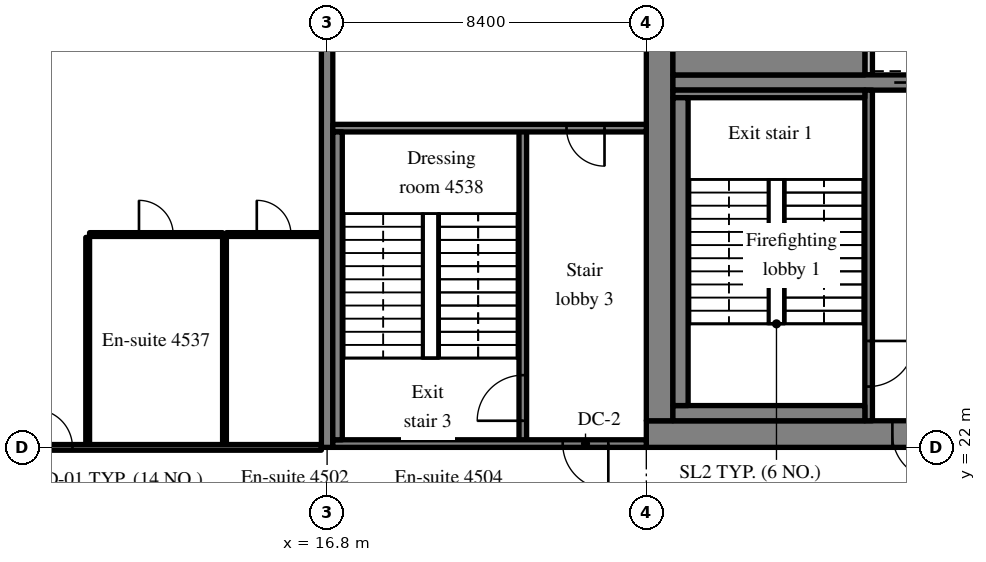
"""IFC4 building model, lengths in metres.
Left out: names, types, materials, properties, quantities, classifications, styles, units other than length and angle.
Written with IfcOpenShell. Run it as: python <this file> out.ifc"""

import sys

from ifc_helpers import new_model, si_unit, direction, frame, frame_2d, origin, place, context, subcontext, project, spatial, rectangle, extrude, source, transform, mapped, element, fill, save


model = new_model("IFC4")
c1 = context("Model", 3, precision=1e-05, world=origin(), true_north=direction((0.0, 1.0)))
c2 = subcontext(c1, "Body", "Model", "MODEL_VIEW")
j1 = project(units=[si_unit("LENGTHUNIT", "METRE"), si_unit("PLANEANGLEUNIT", "RADIAN")], contexts=[c1])
p1 = place(None, origin())
s1 = spatial("IfcSite", under=j1, at=p1, CompositionType="ELEMENT")
p2 = place(p1, origin())
s2 = spatial("IfcBuilding", under=s1, at=p2, CompositionType="ELEMENT")
p3 = place(p2, frame((0.0, 0.0, 185.8)))
s3 = spatial("IfcBuildingStorey", under=s2, at=p3, CompositionType="ELEMENT", Elevation=185.8)
m1 = source(origin(), c2, "Body", "SweptSolid", [
    extrude(rectangle(XDim=50.4, YDim=0.7, at=frame_2d((25.2, 0.0))), origin(), (0.0, 0.0, 1.0), 3.52),
])
p4 = place(p3, frame((25.2, 22.35, 0.0), z_axis=(0.0, 0.0, 1.0), x_axis=(1.0, 0.0, 0.0)))
e1 = element("IfcWall", 1, at=p4, inside=s3, PredefinedType="SHEAR", context=c2, shape_type="MappedRepresentation", body=[
    mapped(m1, transform((0.0, 0.0, 0.0), scale=1.0)),
])
m2 = source(origin(), c2, "Body", "SweptSolid", [
    extrude(rectangle(XDim=1.8, YDim=2.1, at=frame_2d((0.9, 1.05))), frame((0.0, 0.36, 0.0), z_axis=(0.0, -1.0, 0.0), x_axis=(1.0, 0.0, 0.0)), (0.0, 0.0, 1.0), 0.72),
])
p5 = place(p4, frame((15.9, 0.0, 0.0)))
e2 = element("IfcOpeningElement", 2, at=p5, cuts=e1, PredefinedType="OPENING", context=c2, shape_type="MappedRepresentation", body=[
    mapped(m2, transform((0.0, 0.0, 0.0), scale=1.0)),
])
m3 = source(origin(), c2, "Body", "SweptSolid", [
    extrude(rectangle(XDim=0.9, YDim=2.1, at=frame_2d((0.45, 1.05))), frame((0.0, 0.36, 0.0), z_axis=(0.0, -1.0, 0.0), x_axis=(1.0, 0.0, 0.0)), (0.0, 0.0, 1.0), 0.72),
])
p6 = place(p4, frame((9.7, 0.0, 0.0)))
e3 = element("IfcOpeningElement", 3, at=p6, cuts=e1, PredefinedType="OPENING", context=c2, shape_type="MappedRepresentation", body=[
    mapped(m3, transform((0.0, 0.0, 0.0), scale=1.0)),
])
p7 = place(p4, frame((21.5, 0.0, 0.0)))
e4 = element("IfcOpeningElement", 4, at=p7, cuts=e1, PredefinedType="OPENING", context=c2, shape_type="MappedRepresentation", body=[
    mapped(m3, transform((0.0, 0.0, 0.0), scale=1.0)),
])
p8 = place(p4, frame((32.7, 0.0, 0.0)))
e5 = element("IfcOpeningElement", 5, at=p8, cuts=e1, PredefinedType="OPENING", context=c2, shape_type="MappedRepresentation", body=[
    mapped(m2, transform((0.0, 0.0, 0.0), scale=1.0)),
])
m4 = source(origin(), c2, "Body", "SweptSolid", [
    extrude(rectangle(XDim=1.2, YDim=2.1, at=frame_2d((0.6, 1.05))), frame((0.0, 0.36, 0.0), z_axis=(0.0, -1.0, 0.0), x_axis=(1.0, 0.0, 0.0)), (0.0, 0.0, 1.0), 0.72),
])
p9 = place(p4, frame((6.475, 0.0, 0.0)))
e6 = element("IfcOpeningElement", 6, at=p9, cuts=e1, PredefinedType="OPENING", context=c2, shape_type="MappedRepresentation", body=[
    mapped(m4, transform((0.0, 0.0, 0.0), scale=1.0)),
])
p10 = place(p4, frame((47.875, 0.0, 0.0)))
e7 = element("IfcOpeningElement", 7, at=p10, cuts=e1, PredefinedType="OPENING", context=c2, shape_type="MappedRepresentation", body=[
    mapped(m4, transform((0.0, 0.0, 0.0), scale=1.0)),
])
m5 = source(origin(), c2, "Body", "SweptSolid", [
    extrude(rectangle(XDim=18.6, YDim=0.7, at=frame_2d((9.3, 0.0))), origin(), (0.0, 0.0, 1.0), 3.52),
])
p11 = place(p3, frame((25.55, 22.7, 0.0), z_axis=(0.0, 0.0, 1.0), x_axis=(0.0, 1.0, 0.0)))
e8 = element("IfcWall", 8, at=p11, inside=s3, PredefinedType="SHEAR", context=c2, shape_type="MappedRepresentation", body=[
    mapped(m5, transform((0.0, 0.0, 0.0), scale=1.0)),
])
m6 = source(origin(), c2, "Body", "SweptSolid", [
    extrude(rectangle(XDim=7.5, YDim=0.4, at=frame_2d((3.75, 0.0))), origin(), (0.0, 0.0, 1.0), 3.52),
])
p12 = place(p3, frame((25.9, 31.6, 0.0), z_axis=(0.0, 0.0, 1.0), x_axis=(1.0, 0.0, 0.0)))
e9 = element("IfcWall", 9, at=p12, inside=s3, PredefinedType="SHEAR", context=c2, shape_type="MappedRepresentation", body=[
    mapped(m6, transform((0.0, 0.0, 0.0), scale=1.0)),
])
m7 = source(origin(), c2, "Body", "SweptSolid", [
    extrude(rectangle(XDim=1.1, YDim=2.1, at=frame_2d((0.55, 1.05))), frame((0.0, 0.21, 0.0), z_axis=(0.0, -1.0, 0.0), x_axis=(1.0, 0.0, 0.0)), (0.0, 0.0, 1.0), 0.42),
])
p13 = place(p12, frame((5.825, 0.0, 0.0)))
e10 = element("IfcOpeningElement", 10, at=p13, cuts=e9, PredefinedType="OPENING", context=c2, shape_type="MappedRepresentation", body=[
    mapped(m7, transform((0.0, 0.0, 0.0), scale=1.0)),
])
m8 = source(origin(), c2, "Body", "SweptSolid", [
    extrude(rectangle(XDim=20.0, YDim=0.3, at=frame_2d((10.0, 0.0))), origin(), (0.0, 0.0, 1.0), 3.52),
])
p14 = place(p3, frame((16.8, 22.0, 0.0), z_axis=(0.0, 0.0, 1.0), x_axis=(0.0, 1.0, 0.0)))
e11 = element("IfcWall", 11, at=p14, inside=s3, PredefinedType="SHEAR", context=c2, shape_type="MappedRepresentation", body=[
    mapped(m8, transform((0.0, 0.0, 0.0), scale=1.0)),
])
m9 = source(origin(), c2, "Body", "SweptSolid", [
    extrude(rectangle(XDim=8.7, YDim=0.2, at=frame_2d((4.35, 0.0))), origin(), (0.0, 0.0, 1.0), 3.52),
])
p15 = place(p3, frame((31.05, 22.7, 0.0), z_axis=(0.0, 0.0, 1.0), x_axis=(0.0, 1.0, 0.0)))
e12 = element("IfcWall", 12, at=p15, inside=s3, PredefinedType="SOLIDWALL", context=c2, shape_type="MappedRepresentation", body=[
    mapped(m9, transform((0.0, 0.0, 0.0), scale=1.0)),
])
m10 = source(origin(), c2, "Body", "SweptSolid", [
    extrude(rectangle(XDim=1.2, YDim=2.1, at=frame_2d((0.6, 1.05))), frame((0.0, 0.11, 0.0), z_axis=(0.0, -1.0, 0.0), x_axis=(1.0, 0.0, 0.0)), (0.0, 0.0, 1.0), 0.22),
])
p16 = place(p15, frame((0.9, 0.0, 0.0)))
e13 = element("IfcOpeningElement", 13, at=p16, cuts=e12, PredefinedType="OPENING", context=c2, shape_type="MappedRepresentation", body=[
    mapped(m10, transform((0.0, 0.0, 0.0), scale=1.0)),
])
m11 = source(origin(), c2, "Body", "SweptSolid", [
    extrude(rectangle(XDim=1.8, YDim=0.2, at=frame_2d((0.9, 0.0))), origin(), (0.0, 0.0, 1.0), 3.52),
])
p17 = place(p3, frame((31.05, 31.8, 0.0), z_axis=(0.0, 0.0, 1.0), x_axis=(0.0, 1.0, 0.0)))
e14 = element("IfcWall", 14, at=p17, inside=s3, PredefinedType="SOLIDWALL", context=c2, shape_type="MappedRepresentation", body=[
    mapped(m11, transform((0.0, 0.0, 0.0), scale=1.0)),
])
m12 = source(origin(), c2, "Body", "SweptSolid", [
    extrude(rectangle(XDim=8.3, YDim=0.2, at=frame_2d((4.15, 0.0))), origin(), (0.0, 0.0, 1.0), 3.52),
])
p18 = place(p3, frame((21.95, 22.1, 0.0), z_axis=(0.0, 0.0, 1.0), x_axis=(0.0, 1.0, 0.0)))
e15 = element("IfcWall", 15, at=p18, inside=s3, PredefinedType="SOLIDWALL", context=c2, shape_type="MappedRepresentation", body=[
    mapped(m12, transform((0.0, 0.0, 0.0), scale=1.0)),
])
p19 = place(p18, frame((0.6, 0.0, 0.0)))
e16 = element("IfcOpeningElement", 16, at=p19, cuts=e15, PredefinedType="OPENING", context=c2, shape_type="MappedRepresentation", body=[
    mapped(m10, transform((0.0, 0.0, 0.0), scale=1.0)),
])
m13 = source(origin(), c2, "Body", "SweptSolid", [
    extrude(rectangle(XDim=8.25, YDim=0.2, at=frame_2d((4.125, 0.0))), origin(), (0.0, 0.0, 1.0), 3.52),
])
p20 = place(p3, frame((16.95, 22.1, 0.0), z_axis=(0.0, 0.0, 1.0), x_axis=(1.0, 0.0, 0.0)))
e17 = element("IfcWall", 17, at=p20, inside=s3, PredefinedType="SOLIDWALL", context=c2, shape_type="MappedRepresentation", body=[
    mapped(m13, transform((0.0, 0.0, 0.0), scale=1.0)),
])
p21 = place(p20, frame((6.05, 0.0, 0.0)))
e18 = element("IfcOpeningElement", 18, at=p21, cuts=e17, PredefinedType="OPENING", context=c2, shape_type="MappedRepresentation", body=[
    mapped(m10, transform((0.0, 0.0, 0.0), scale=1.0)),
])
p22 = place(p3, frame((16.95, 30.4, 0.0), z_axis=(0.0, 0.0, 1.0), x_axis=(1.0, 0.0, 0.0)))
e19 = element("IfcWall", 19, at=p22, inside=s3, PredefinedType="SOLIDWALL", context=c2, shape_type="MappedRepresentation", body=[
    mapped(m13, transform((0.0, 0.0, 0.0), scale=1.0)),
])
m14 = source(origin(), c2, "Body", "SweptSolid", [
    extrude(rectangle(XDim=1.0, YDim=2.1, at=frame_2d((0.5, 1.05))), frame((0.0, 0.11, 0.0), z_axis=(0.0, -1.0, 0.0), x_axis=(1.0, 0.0, 0.0)), (0.0, 0.0, 1.0), 0.22),
])
p23 = place(p22, frame((6.15, 0.0, 0.0)))
e20 = element("IfcOpeningElement", 20, at=p23, cuts=e19, PredefinedType="OPENING", context=c2, shape_type="MappedRepresentation", body=[
    mapped(m14, transform((0.0, 0.0, 0.0), scale=1.0)),
])
m15 = source(origin(), c2, "Body", "SweptSolid", [
    extrude(rectangle(XDim=5.05, YDim=0.4, at=frame_2d((2.525, 0.0))), origin(), (0.0, 0.0, 1.0), 3.52),
])
p24 = place(p3, frame((25.9, 22.9, 0.0), z_axis=(0.0, 0.0, 1.0), x_axis=(1.0, 0.0, 0.0)))
e21 = element("IfcWall", 21, at=p24, inside=s3, PredefinedType="SOLIDWALL", context=c2, shape_type="MappedRepresentation", body=[
    mapped(m15, transform((0.0, 0.0, 0.0), scale=1.0)),
])
m16 = source(origin(), c2, "Body", "SweptSolid", [
    extrude(rectangle(XDim=5.05, YDim=0.2, at=frame_2d((2.525, 0.0))), origin(), (0.0, 0.0, 1.0), 3.52),
])
p25 = place(p3, frame((25.9, 31.3, 0.0), z_axis=(0.0, 0.0, 1.0), x_axis=(1.0, 0.0, 0.0)))
e22 = element("IfcWall", 22, at=p25, inside=s3, PredefinedType="SOLIDWALL", context=c2, shape_type="MappedRepresentation", body=[
    mapped(m16, transform((0.0, 0.0, 0.0), scale=1.0)),
])
m17 = source(origin(), c2, "Body", "SweptSolid", [
    extrude(rectangle(XDim=8.1, YDim=0.4, at=frame_2d((4.05, 0.0))), origin(), (0.0, 0.0, 1.0), 3.52),
])
p26 = place(p3, frame((26.1, 23.1, 0.0), z_axis=(0.0, 0.0, 1.0), x_axis=(0.0, 1.0, 0.0)))
e23 = element("IfcWall", 23, at=p26, inside=s3, PredefinedType="SOLIDWALL", context=c2, shape_type="MappedRepresentation", body=[
    mapped(m17, transform((0.0, 0.0, 0.0), scale=1.0)),
])
m18 = source(origin(), c2, "Body", "SweptSolid", [
    extrude(rectangle(XDim=8.1, YDim=0.25, at=frame_2d((4.05, 0.0))), origin(), (0.0, 0.0, 1.0), 3.52),
])
p27 = place(p3, frame((17.075, 22.2, 0.0), z_axis=(0.0, 0.0, 1.0), x_axis=(0.0, 1.0, 0.0)))
e24 = element("IfcWall", 24, at=p27, inside=s3, PredefinedType="SOLIDWALL", context=c2, shape_type="MappedRepresentation", body=[
    mapped(m18, transform((0.0, 0.0, 0.0), scale=1.0)),
])
m19 = source(origin(), c2, "Body", "SweptSolid", [
    extrude(rectangle(XDim=5.05, YDim=1.0, at=frame_2d((2.525, 0.0))), origin(), (0.0, 0.0, 1.0), 3.52),
])
p28 = place(p3, frame((25.9, 32.3, 0.0), z_axis=(0.0, 0.0, 1.0), x_axis=(1.0, 0.0, 0.0)))
e25 = element("IfcWall", 25, at=p28, inside=s3, PredefinedType="SOLIDWALL", context=c2, shape_type="MappedRepresentation", body=[
    mapped(m19, transform((0.0, 0.0, 0.0), scale=1.0)),
])
m20 = source(origin(), c2, "Body", "SweptSolid", [
    extrude(rectangle(XDim=5.45, YDim=0.1, at=frame_2d((2.725, 0.0))), origin(), (0.0, 0.0, 1.0), 3.52),
])
for number, where, z_axis, x_axis in (
    (26, (10.5, 22.075, 0.0), (0.0, 0.0, 1.0), (0.0, 1.0, 0.0)),
    (27, (14.1, 22.075, 0.0), (0.0, 0.0, 1.0), (0.0, 1.0, 0.0)),
):
    element("IfcWall", number, at=place(p3, frame(where, z_axis=z_axis, x_axis=x_axis)), inside=s3, PredefinedType="PARTITIONING", context=c2, shape_type="MappedRepresentation", body=[
        mapped(m20, transform((0.0, 0.0, 0.0), scale=1.0)),
    ])
m21 = source(origin(), c2, "Body", "SweptSolid", [
    extrude(rectangle(XDim=3.5, YDim=0.1, at=frame_2d((1.75, 0.0))), origin(), (0.0, 0.0, 1.0), 3.52),
])
p29 = place(p3, frame((10.55, 27.6, 0.0), z_axis=(0.0, 0.0, 1.0), x_axis=(1.0, 0.0, 0.0)))
e28 = element("IfcWall", 28, at=p29, inside=s3, PredefinedType="PARTITIONING", context=c2, shape_type="MappedRepresentation", body=[
    mapped(m21, transform((0.0, 0.0, 0.0), scale=1.0)),
])
m22 = source(origin(), c2, "Body", "SweptSolid", [
    extrude(rectangle(XDim=0.9, YDim=2.1, at=frame_2d((0.45, 1.05))), frame((0.0, 0.06, 0.0), z_axis=(0.0, -1.0, 0.0), x_axis=(1.0, 0.0, 0.0)), (0.0, 0.0, 1.0), 0.12),
])
p30 = place(p29, frame((1.3, 0.0, 0.0)))
e29 = element("IfcOpeningElement", 29, at=p30, cuts=e28, PredefinedType="OPENING", context=c2, shape_type="MappedRepresentation", body=[
    mapped(m22, transform((0.0, 0.0, 0.0), scale=1.0)),
])
m23 = source(origin(), c2, "Body", "SweptSolid", [
    extrude(rectangle(XDim=2.5, YDim=0.1, at=frame_2d((1.25, 0.0))), origin(), (0.0, 0.0, 1.0), 3.52),
])
p31 = place(p3, frame((14.15, 27.6, 0.0), z_axis=(0.0, 0.0, 1.0), x_axis=(1.0, 0.0, 0.0)))
e30 = element("IfcWall", 30, at=p31, inside=s3, PredefinedType="PARTITIONING", context=c2, shape_type="MappedRepresentation", body=[
    mapped(m23, transform((0.0, 0.0, 0.0), scale=1.0)),
])
p32 = place(p31, frame((0.8, 0.0, 0.0)))
e31 = element("IfcOpeningElement", 31, at=p32, cuts=e30, PredefinedType="OPENING", context=c2, shape_type="MappedRepresentation", body=[
    mapped(m22, transform((0.0, 0.0, 0.0), scale=1.0)),
])
m24 = source(origin(), c2, "Body", "SweptSolid", [
    extrude(rectangle(XDim=7.95, YDim=0.15, at=frame_2d((3.975, 0.0))), origin(), (0.0, 0.0, 1.0), 2.82),
])
p33 = place(p3, frame((8.7, 22.0, 0.0), z_axis=(0.0, 0.0, 1.0), x_axis=(1.0, 0.0, 0.0)))
e32 = element("IfcWall", 32, at=p33, inside=s3, PredefinedType="PARTITIONING", context=c2, shape_type="MappedRepresentation", body=[
    mapped(m24, transform((0.0, 0.0, 0.0), scale=1.0)),
])
m25 = source(origin(), c2, "Body", "SweptSolid", [
    extrude(rectangle(XDim=1.0, YDim=2.1, at=frame_2d((0.5, 1.05))), frame((0.0, 0.085, 0.0), z_axis=(0.0, -1.0, 0.0), x_axis=(1.0, 0.0, 0.0)), (0.0, 0.0, 1.0), 0.17),
])
p34 = place(p33, frame((0.4, 0.0, 0.0)))
e33 = element("IfcOpeningElement", 33, at=p34, cuts=e32, PredefinedType="OPENING", context=c2, shape_type="MappedRepresentation", body=[
    mapped(m25, transform((0.0, 0.0, 0.0), scale=1.0)),
])
m26 = source(origin(), c2, "Body", "SweptSolid", [
    extrude(rectangle(XDim=1.2, YDim=2.1, at=frame_2d((0.6, 1.05))), frame((0.0, 0.025, 0.0), z_axis=(0.0, -1.0, 0.0), x_axis=(1.0, 0.0, 0.0)), (0.0, 0.0, 1.0), 0.05),
])
p35 = place(p16, origin())
e34 = element("IfcDoor", 34, at=p35, inside=s3, OperationType="SINGLE_SWING_RIGHT", PredefinedType="DOOR", context=c2, shape_type="MappedRepresentation", body=[
    mapped(m26, transform((0.0, 0.0, 0.0), scale=1.0)),
])
fill(e13, e34)
m27 = source(origin(), c2, "Body", "SweptSolid", [
    extrude(rectangle(XDim=1.2, YDim=2.1, at=frame_2d((0.6, 1.05))), frame((0.0, 0.275, 0.0), z_axis=(0.0, -1.0, 0.0), x_axis=(1.0, 0.0, 0.0)), (0.0, 0.0, 1.0), 0.05),
])
p36 = place(p9, origin())
e35 = element("IfcDoor", 35, at=p36, inside=s3, OperationType="SINGLE_SWING_RIGHT", PredefinedType="DOOR", context=c2, shape_type="MappedRepresentation", body=[
    mapped(m27, transform((0.0, 0.0, 0.0), scale=1.0)),
])
fill(e6, e35)
m28 = source(origin(), c2, "Body", "SweptSolid", [
    extrude(rectangle(XDim=1.1, YDim=2.1, at=frame_2d((0.55, 1.05))), frame((0.0, 0.025, 0.0), z_axis=(0.0, -1.0, 0.0), x_axis=(1.0, 0.0, 0.0)), (0.0, 0.0, 1.0), 0.05),
])
p37 = place(p13, origin())
e36 = element("IfcDoor", 36, at=p37, inside=s3, OperationType="SLIDING_TO_RIGHT", PredefinedType="DOOR", context=c2, shape_type="MappedRepresentation", body=[
    mapped(m28, transform((0.0, 0.0, 0.0), scale=1.0)),
])
fill(e10, e36)
p38 = place(p19, origin())
e37 = element("IfcDoor", 37, at=p38, inside=s3, OperationType="SINGLE_SWING_LEFT", PredefinedType="DOOR", context=c2, shape_type="MappedRepresentation", body=[
    mapped(m26, transform((0.0, 0.0, 0.0), scale=1.0)),
])
fill(e16, e37)
p39 = place(p21, origin())
e38 = element("IfcDoor", 38, at=p39, inside=s3, OperationType="SINGLE_SWING_RIGHT", PredefinedType="DOOR", context=c2, shape_type="MappedRepresentation", body=[
    mapped(m26, transform((0.0, 0.0, 0.0), scale=1.0)),
])
fill(e18, e38)
m29 = source(origin(), c2, "Body", "SweptSolid", [
    extrude(rectangle(XDim=1.0, YDim=2.1, at=frame_2d((0.5, 1.05))), frame((0.0, 0.025, 0.0), z_axis=(0.0, -1.0, 0.0), x_axis=(1.0, 0.0, 0.0)), (0.0, 0.0, 1.0), 0.05),
])
p40 = place(p23, origin())
e39 = element("IfcDoor", 39, at=p40, inside=s3, OperationType="SINGLE_SWING_RIGHT", PredefinedType="DOOR", context=c2, shape_type="MappedRepresentation", body=[
    mapped(m29, transform((0.0, 0.0, 0.0), scale=1.0)),
])
fill(e20, e39)
m30 = source(origin(), c2, "Body", "SweptSolid", [
    extrude(rectangle(XDim=0.9, YDim=2.1, at=frame_2d((0.45, 1.05))), frame((0.0, 0.025, 0.0), z_axis=(0.0, -1.0, 0.0), x_axis=(1.0, 0.0, 0.0)), (0.0, 0.0, 1.0), 0.05),
])
p41 = place(p30, origin())
e40 = element("IfcDoor", 40, at=p41, inside=s3, OperationType="SINGLE_SWING_LEFT", PredefinedType="DOOR", context=c2, shape_type="MappedRepresentation", body=[
    mapped(m30, transform((0.0, 0.0, 0.0), scale=1.0)),
])
fill(e29, e40)
p42 = place(p32, origin())
e41 = element("IfcDoor", 41, at=p42, inside=s3, OperationType="SINGLE_SWING_LEFT", PredefinedType="DOOR", context=c2, shape_type="MappedRepresentation", body=[
    mapped(m30, transform((0.0, 0.0, 0.0), scale=1.0)),
])
fill(e31, e41)
p43 = place(p34, origin())
e42 = element("IfcDoor", 42, at=p43, inside=s3, OperationType="SINGLE_SWING_LEFT", PredefinedType="DOOR", context=c2, shape_type="MappedRepresentation", body=[
    mapped(m29, transform((0.0, 0.0, 0.0), scale=1.0)),
])
fill(e33, e42)
save(model, sys.argv[1])
